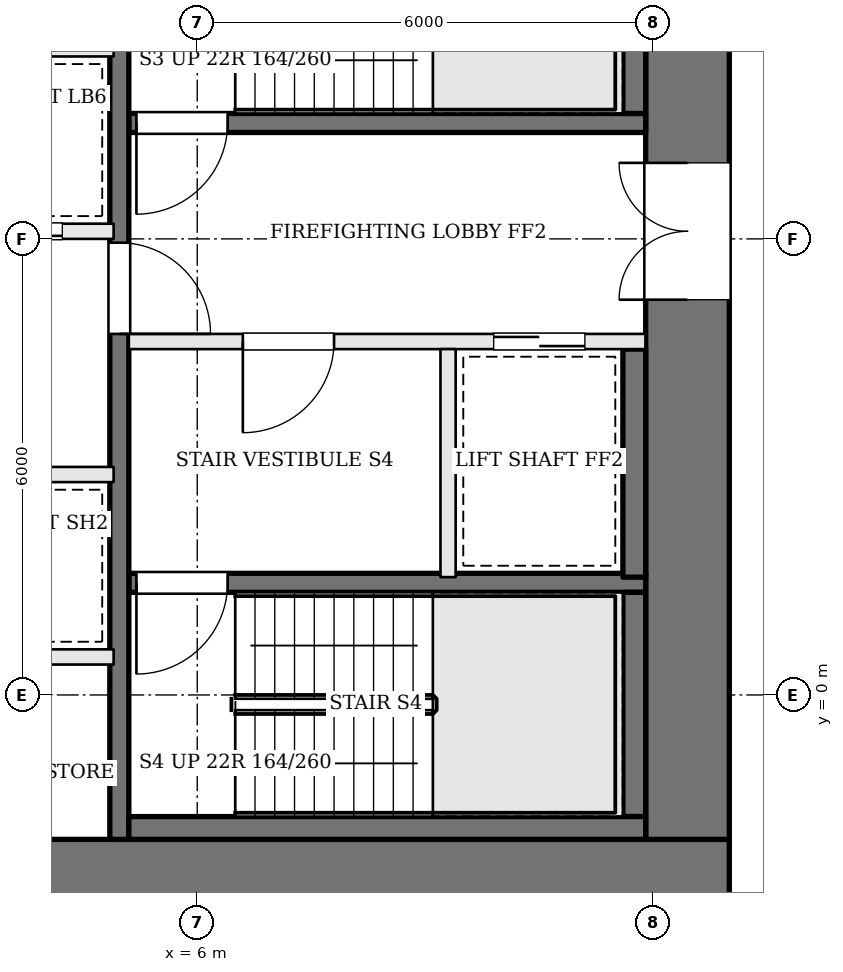
"""IFC4 building model, lengths in metres.
Left out: names, types, materials, properties, quantities, classifications, styles, units other than length and angle.
Written with IfcOpenShell. Run it as: python <this file> out.ifc"""

import sys

from ifc_helpers import new_model, si_unit, direction, frame, frame_2d, origin, place, context, subcontext, project, spatial, rectangle, extrude, element, fill, save


model = new_model("IFC4")
c1 = context("Model", 3, precision=1e-05, world=origin(), true_north=direction((0.0, 1.0)))
c2 = subcontext(c1, "Body", "Model", "MODEL_VIEW")
j1 = project(units=[si_unit("LENGTHUNIT", "METRE"), si_unit("PLANEANGLEUNIT", "RADIAN")], contexts=[c1])
p1 = place(None, origin())
s1 = spatial("IfcSite", under=j1, at=p1, CompositionType="ELEMENT")
p2 = place(p1, origin())
s2 = spatial("IfcBuilding", under=s1, at=p2, CompositionType="ELEMENT")
p3 = place(p2, frame((0.0, 0.0, 114.0)))
s3 = spatial("IfcBuildingStorey", under=s2, at=p3, CompositionType="ELEMENT", Elevation=114.0)
p4 = place(p3, frame((-13.0, -2.45, 0.0), z_axis=(0.0, 0.0, 1.0), x_axis=(1.0, 0.0, 0.0)))
e1 = element("IfcWall", 1, at=p4, inside=s3, PredefinedType="SHEAR", context=c2, shape_type="SweptSolid", body=[
    extrude(rectangle(XDim=26.0, YDim=1.1, at=frame_2d((13.0, 0.0))), origin(), (0.0, 0.0, 1.0), 3.6),
])
p5 = place(p4, frame((8.825, 0.0, 0.0)))
e2 = element("IfcOpeningElement", 2, at=p5, cuts=e1, PredefinedType="OPENING", context=c2, shape_type="SweptSolid", body=[
    extrude(rectangle(XDim=1.0, YDim=2.1, at=frame_2d((0.5, 1.05))), frame((0.0, 0.56, 0.0), z_axis=(0.0, -1.0, 0.0), x_axis=(1.0, 0.0, 0.0)), (0.0, 0.0, 1.0), 1.12),
])
p6 = place(p4, frame((11.275, 0.0, 0.0)))
e3 = element("IfcOpeningElement", 3, at=p6, cuts=e1, PredefinedType="OPENING", context=c2, shape_type="SweptSolid", body=[
    extrude(rectangle(XDim=1.0, YDim=2.1, at=frame_2d((0.5, 1.05))), frame((0.0, 0.56, 0.0), z_axis=(0.0, -1.0, 0.0), x_axis=(1.0, 0.0, 0.0)), (0.0, 0.0, 1.0), 1.12),
])
p7 = place(p4, frame((13.475, 0.0, 0.0)))
e4 = element("IfcOpeningElement", 4, at=p7, cuts=e1, PredefinedType="OPENING", context=c2, shape_type="SweptSolid", body=[
    extrude(rectangle(XDim=0.7, YDim=2.1, at=frame_2d((0.35, 1.05))), frame((0.0, 0.56, 0.0), z_axis=(0.0, -1.0, 0.0), x_axis=(1.0, 0.0, 0.0)), (0.0, 0.0, 1.0), 1.12),
])
p8 = place(p4, frame((15.775, 0.0, 0.0)))
e5 = element("IfcOpeningElement", 5, at=p8, cuts=e1, PredefinedType="OPENING", context=c2, shape_type="SweptSolid", body=[
    extrude(rectangle(XDim=1.0, YDim=2.1, at=frame_2d((0.5, 1.05))), frame((0.0, 0.56, 0.0), z_axis=(0.0, -1.0, 0.0), x_axis=(1.0, 0.0, 0.0)), (0.0, 0.0, 1.0), 1.12),
])
p9 = place(p3, frame((12.45, -1.9, 0.0), z_axis=(0.0, 0.0, 1.0), x_axis=(0.0, 1.0, 0.0)))
e6 = element("IfcWall", 6, at=p9, inside=s3, PredefinedType="SHEAR", context=c2, shape_type="SweptSolid", body=[
    extrude(rectangle(XDim=12.8, YDim=1.1, at=frame_2d((6.4, 0.0))), origin(), (0.0, 0.0, 1.0), 3.6),
])
p10 = place(p9, frame((7.1, 0.0, 0.0)))
e7 = element("IfcOpeningElement", 7, at=p10, cuts=e6, PredefinedType="OPENING", context=c2, shape_type="SweptSolid", body=[
    extrude(rectangle(XDim=1.8, YDim=2.1, at=frame_2d((0.9, 1.05))), frame((0.0, 0.56, 0.0), z_axis=(0.0, -1.0, 0.0), x_axis=(1.0, 0.0, 0.0)), (0.0, 0.0, 1.0), 1.12),
])
p11 = place(p3, frame((11.9, 7.525, 0.0), z_axis=(0.0, 0.0, 1.0), x_axis=(-1.0, 0.0, 0.0)))
e8 = element("IfcWall", 8, at=p11, inside=s3, PredefinedType="SOLIDWALL", context=c2, shape_type="SweptSolid", body=[
    extrude(rectangle(XDim=6.8, YDim=0.25, at=frame_2d((3.4, 0.0))), origin(), (0.0, 0.0, 1.0), 3.4),
])
p12 = place(p11, frame((5.5, 0.0, 0.0)))
e9 = element("IfcOpeningElement", 9, at=p12, cuts=e8, PredefinedType="OPENING", context=c2, shape_type="SweptSolid", body=[
    extrude(rectangle(XDim=1.2, YDim=2.1, at=frame_2d((0.6, 1.05))), frame((0.0, 0.135, 0.0), z_axis=(0.0, -1.0, 0.0), x_axis=(1.0, 0.0, 0.0)), (0.0, 0.0, 1.0), 0.27),
])
p13 = place(p3, frame((11.9, 4.65, 0.0), z_axis=(0.0, 0.0, 1.0), x_axis=(-1.0, 0.0, 0.0)))
e10 = element("IfcWall", 10, at=p13, inside=s3, PredefinedType="SOLIDWALL", context=c2, shape_type="SweptSolid", body=[
    extrude(rectangle(XDim=6.8, YDim=0.2, at=frame_2d((3.4, 0.0))), origin(), (0.0, 0.0, 1.0), 3.4),
])
p14 = place(p13, frame((4.1, 0.0, 0.0)))
e11 = element("IfcOpeningElement", 11, at=p14, cuts=e10, PredefinedType="OPENING", context=c2, shape_type="SweptSolid", body=[
    extrude(rectangle(XDim=1.2, YDim=2.1, at=frame_2d((0.6, 1.05))), frame((0.0, 0.11, 0.0), z_axis=(0.0, -1.0, 0.0), x_axis=(1.0, 0.0, 0.0)), (0.0, 0.0, 1.0), 0.22),
])
p15 = place(p13, frame((0.8, 0.0, 0.0)))
e12 = element("IfcOpeningElement", 12, at=p15, cuts=e10, PredefinedType="OPENING", context=c2, shape_type="SweptSolid", body=[
    extrude(rectangle(XDim=1.2, YDim=2.1, at=frame_2d((0.6, 1.05))), frame((0.0, 0.11, 0.0), z_axis=(0.0, -1.0, 0.0), x_axis=(1.0, 0.0, 0.0)), (0.0, 0.0, 1.0), 0.22),
])
p16 = place(p3, frame((11.9, 1.475, 0.0), z_axis=(0.0, 0.0, 1.0), x_axis=(-1.0, 0.0, 0.0)))
e13 = element("IfcWall", 13, at=p16, inside=s3, PredefinedType="SOLIDWALL", context=c2, shape_type="SweptSolid", body=[
    extrude(rectangle(XDim=6.8, YDim=0.25, at=frame_2d((3.4, 0.0))), origin(), (0.0, 0.0, 1.0), 3.4),
])
p17 = place(p16, frame((5.5, 0.0, 0.0)))
e14 = element("IfcOpeningElement", 14, at=p17, cuts=e13, PredefinedType="OPENING", context=c2, shape_type="SweptSolid", body=[
    extrude(rectangle(XDim=1.2, YDim=2.1, at=frame_2d((0.6, 1.05))), frame((0.0, 0.135, 0.0), z_axis=(0.0, -1.0, 0.0), x_axis=(1.0, 0.0, 0.0)), (0.0, 0.0, 1.0), 0.27),
])
p18 = place(p3, frame((9.3, 4.55, 0.0), z_axis=(0.0, 0.0, 1.0), x_axis=(0.0, -1.0, 0.0)))
e15 = element("IfcWall", 15, at=p18, inside=s3, PredefinedType="SOLIDWALL", context=c2, shape_type="SweptSolid", body=[
    extrude(rectangle(XDim=3.0, YDim=0.2, at=frame_2d((1.5, 0.0))), origin(), (0.0, 0.0, 1.0), 3.4),
])
p19 = place(p3, frame((4.975, 10.9, 0.0), z_axis=(0.0, 0.0, 1.0), x_axis=(0.0, -1.0, 0.0)))
e16 = element("IfcWall", 16, at=p19, inside=s3, PredefinedType="SOLIDWALL", context=c2, shape_type="SweptSolid", body=[
    extrude(rectangle(XDim=12.8, YDim=0.25, at=frame_2d((6.4, 0.0))), origin(), (0.0, 0.0, 1.0), 3.4),
])
p20 = place(p19, frame((4.95, 0.0, 0.0)))
e17 = element("IfcOpeningElement", 17, at=p20, cuts=e16, PredefinedType="OPENING", context=c2, shape_type="SweptSolid", body=[
    extrude(rectangle(XDim=1.2, YDim=2.1, at=frame_2d((0.6, 1.05))), frame((0.0, 0.135, 0.0), z_axis=(0.0, -1.0, 0.0), x_axis=(1.0, 0.0, 0.0)), (0.0, 0.0, 1.0), 0.27),
])
p21 = place(p3, frame((11.75, 10.6, 0.0), z_axis=(0.0, 0.0, 1.0), x_axis=(0.0, -1.0, 0.0)))
e18 = element("IfcWall", 18, at=p21, inside=s3, PredefinedType="SOLIDWALL", context=c2, shape_type="SweptSolid", body=[
    extrude(rectangle(XDim=2.95, YDim=0.3, at=frame_2d((1.475, 0.0))), origin(), (0.0, 0.0, 1.0), 3.4),
])
p22 = place(p3, frame((11.75, 4.55, 0.0), z_axis=(0.0, 0.0, 1.0), x_axis=(0.0, -1.0, 0.0)))
e19 = element("IfcWall", 19, at=p22, inside=s3, PredefinedType="SOLIDWALL", context=c2, shape_type="SweptSolid", body=[
    extrude(rectangle(XDim=3.0, YDim=0.3, at=frame_2d((1.5, 0.0))), origin(), (0.0, 0.0, 1.0), 3.4),
])
p23 = place(p3, frame((11.75, 1.35, 0.0), z_axis=(0.0, 0.0, 1.0), x_axis=(0.0, -1.0, 0.0)))
e20 = element("IfcWall", 20, at=p23, inside=s3, PredefinedType="SOLIDWALL", context=c2, shape_type="SweptSolid", body=[
    extrude(rectangle(XDim=2.95, YDim=0.3, at=frame_2d((1.475, 0.0))), origin(), (0.0, 0.0, 1.0), 3.4),
])
p24 = place(p3, frame((11.9, -1.75, 0.0), z_axis=(0.0, 0.0, 1.0), x_axis=(-1.0, 0.0, 0.0)))
e21 = element("IfcWall", 21, at=p24, inside=s3, PredefinedType="SOLIDWALL", context=c2, shape_type="SweptSolid", body=[
    extrude(rectangle(XDim=6.8, YDim=0.3, at=frame_2d((3.4, 0.0))), origin(), (0.0, 0.0, 1.0), 3.4),
])
p25 = place(p3, frame((-4.9, 0.5, 0.0), z_axis=(0.0, 0.0, 1.0), x_axis=(1.0, 0.0, 0.0)))
e22 = element("IfcWall", 22, at=p25, inside=s3, PredefinedType="SOLIDWALL", context=c2, shape_type="SweptSolid", body=[
    extrude(rectangle(XDim=9.8, YDim=0.2, at=frame_2d((4.9, 0.0))), origin(), (0.0, 0.0, 1.0), 3.4),
])
p26 = place(p3, frame((-4.9, 2.9, 0.0), z_axis=(0.0, 0.0, 1.0), x_axis=(1.0, 0.0, 0.0)))
e23 = element("IfcWall", 23, at=p26, inside=s3, PredefinedType="SOLIDWALL", context=c2, shape_type="SweptSolid", body=[
    extrude(rectangle(XDim=9.8, YDim=0.2, at=frame_2d((4.9, 0.0))), origin(), (0.0, 0.0, 1.0), 3.4),
])
p27 = place(p26, frame((0.675, 0.0, 0.0)))
e24 = element("IfcOpeningElement", 24, at=p27, cuts=e23, PredefinedType="OPENING", context=c2, shape_type="SweptSolid", body=[
    extrude(rectangle(XDim=1.1, YDim=2.1, at=frame_2d((0.55, 1.05))), frame((0.0, 0.11, 0.0), z_axis=(0.0, -1.0, 0.0), x_axis=(1.0, 0.0, 0.0)), (0.0, 0.0, 1.0), 0.22),
])
p28 = place(p26, frame((3.125, 0.0, 0.0)))
e25 = element("IfcOpeningElement", 25, at=p28, cuts=e23, PredefinedType="OPENING", context=c2, shape_type="SweptSolid", body=[
    extrude(rectangle(XDim=1.1, YDim=2.1, at=frame_2d((0.55, 1.05))), frame((0.0, 0.11, 0.0), z_axis=(0.0, -1.0, 0.0), x_axis=(1.0, 0.0, 0.0)), (0.0, 0.0, 1.0), 0.22),
])
p29 = place(p3, frame((-4.9, 6.1, 0.0), z_axis=(0.0, 0.0, 1.0), x_axis=(1.0, 0.0, 0.0)))
e26 = element("IfcWall", 26, at=p29, inside=s3, PredefinedType="SOLIDWALL", context=c2, shape_type="SweptSolid", body=[
    extrude(rectangle(XDim=9.8, YDim=0.2, at=frame_2d((4.9, 0.0))), origin(), (0.0, 0.0, 1.0), 3.4),
])
p30 = place(p29, frame((0.675, 0.0, 0.0)))
e27 = element("IfcOpeningElement", 27, at=p30, cuts=e26, PredefinedType="OPENING", context=c2, shape_type="SweptSolid", body=[
    extrude(rectangle(XDim=1.1, YDim=2.1, at=frame_2d((0.55, 1.05))), frame((0.0, 0.11, 0.0), z_axis=(0.0, -1.0, 0.0), x_axis=(1.0, 0.0, 0.0)), (0.0, 0.0, 1.0), 0.22),
])
p31 = place(p29, frame((3.125, 0.0, 0.0)))
e28 = element("IfcOpeningElement", 28, at=p31, cuts=e26, PredefinedType="OPENING", context=c2, shape_type="SweptSolid", body=[
    extrude(rectangle(XDim=1.1, YDim=2.1, at=frame_2d((0.55, 1.05))), frame((0.0, 0.11, 0.0), z_axis=(0.0, -1.0, 0.0), x_axis=(1.0, 0.0, 0.0)), (0.0, 0.0, 1.0), 0.22),
])
p32 = place(p29, frame((5.575, 0.0, 0.0)))
e29 = element("IfcOpeningElement", 29, at=p32, cuts=e26, PredefinedType="OPENING", context=c2, shape_type="SweptSolid", body=[
    extrude(rectangle(XDim=1.1, YDim=2.1, at=frame_2d((0.55, 1.05))), frame((0.0, 0.11, 0.0), z_axis=(0.0, -1.0, 0.0), x_axis=(1.0, 0.0, 0.0)), (0.0, 0.0, 1.0), 0.22),
])
p33 = place(p29, frame((8.025, 0.0, 0.0)))
e30 = element("IfcOpeningElement", 30, at=p33, cuts=e26, PredefinedType="OPENING", context=c2, shape_type="SweptSolid", body=[
    extrude(rectangle(XDim=1.1, YDim=2.1, at=frame_2d((0.55, 1.05))), frame((0.0, 0.11, 0.0), z_axis=(0.0, -1.0, 0.0), x_axis=(1.0, 0.0, 0.0)), (0.0, 0.0, 1.0), 0.22),
])
p34 = place(p3, frame((-4.9, 8.5, 0.0), z_axis=(0.0, 0.0, 1.0), x_axis=(1.0, 0.0, 0.0)))
e31 = element("IfcWall", 31, at=p34, inside=s3, PredefinedType="SOLIDWALL", context=c2, shape_type="SweptSolid", body=[
    extrude(rectangle(XDim=9.8, YDim=0.2, at=frame_2d((4.9, 0.0))), origin(), (0.0, 0.0, 1.0), 3.4),
])
p35 = place(p10, origin())
e32 = element("IfcDoor", 32, at=p35, inside=s3, OperationType="DOUBLE_DOOR_SINGLE_SWING", PredefinedType="DOOR", context=c2, shape_type="SweptSolid", body=[
    extrude(rectangle(XDim=1.8, YDim=2.1, at=frame_2d((0.9, 1.05))), frame((0.0, 0.025, 0.0), z_axis=(0.0, -1.0, 0.0), x_axis=(1.0, 0.0, 0.0)), (0.0, 0.0, 1.0), 0.05),
])
fill(e7, e32)
p36 = place(p20, origin())
e33 = element("IfcDoor", 33, at=p36, inside=s3, OperationType="SINGLE_SWING_RIGHT", PredefinedType="DOOR", context=c2, shape_type="SweptSolid", body=[
    extrude(rectangle(XDim=1.2, YDim=2.1, at=frame_2d((0.6, 1.05))), frame((0.0, 0.025, 0.0), z_axis=(0.0, -1.0, 0.0), x_axis=(1.0, 0.0, 0.0)), (0.0, 0.0, 1.0), 0.05),
])
fill(e17, e33)
p37 = place(p14, origin())
e34 = element("IfcDoor", 34, at=p37, inside=s3, OperationType="SINGLE_SWING_RIGHT", PredefinedType="DOOR", context=c2, shape_type="SweptSolid", body=[
    extrude(rectangle(XDim=1.2, YDim=2.1, at=frame_2d((0.6, 1.05))), frame((0.0, 0.025, 0.0), z_axis=(0.0, -1.0, 0.0), x_axis=(1.0, 0.0, 0.0)), (0.0, 0.0, 1.0), 0.05),
])
fill(e11, e34)
p38 = place(p12, origin())
e35 = element("IfcDoor", 35, at=p38, inside=s3, OperationType="SINGLE_SWING_RIGHT", PredefinedType="DOOR", context=c2, shape_type="SweptSolid", body=[
    extrude(rectangle(XDim=1.2, YDim=2.1, at=frame_2d((0.6, 1.05))), frame((0.0, 0.025, 0.0), z_axis=(0.0, -1.0, 0.0), x_axis=(1.0, 0.0, 0.0)), (0.0, 0.0, 1.0), 0.05),
])
fill(e9, e35)
p39 = place(p17, origin())
e36 = element("IfcDoor", 36, at=p39, inside=s3, OperationType="SINGLE_SWING_RIGHT", PredefinedType="DOOR", context=c2, shape_type="SweptSolid", body=[
    extrude(rectangle(XDim=1.2, YDim=2.1, at=frame_2d((0.6, 1.05))), frame((0.0, 0.025, 0.0), z_axis=(0.0, -1.0, 0.0), x_axis=(1.0, 0.0, 0.0)), (0.0, 0.0, 1.0), 0.05),
])
fill(e14, e36)
p40 = place(p15, origin())
e37 = element("IfcDoor", 37, at=p40, inside=s3, OperationType="SLIDING_TO_RIGHT", PredefinedType="DOOR", context=c2, shape_type="SweptSolid", body=[
    extrude(rectangle(XDim=1.2, YDim=2.1, at=frame_2d((0.6, 1.05))), frame((0.0, 0.025, 0.0), z_axis=(0.0, -1.0, 0.0), x_axis=(1.0, 0.0, 0.0)), (0.0, 0.0, 1.0), 0.05),
])
fill(e12, e37)
p41 = place(p33, origin())
e38 = element("IfcDoor", 38, at=p41, inside=s3, OperationType="SLIDING_TO_LEFT", PredefinedType="DOOR", context=c2, shape_type="SweptSolid", body=[
    extrude(rectangle(XDim=1.1, YDim=2.1, at=frame_2d((0.55, 1.05))), frame((0.0, 0.025, 0.0), z_axis=(0.0, -1.0, 0.0), x_axis=(1.0, 0.0, 0.0)), (0.0, 0.0, 1.0), 0.05),
])
fill(e30, e38)
save(model, sys.argv[1])
